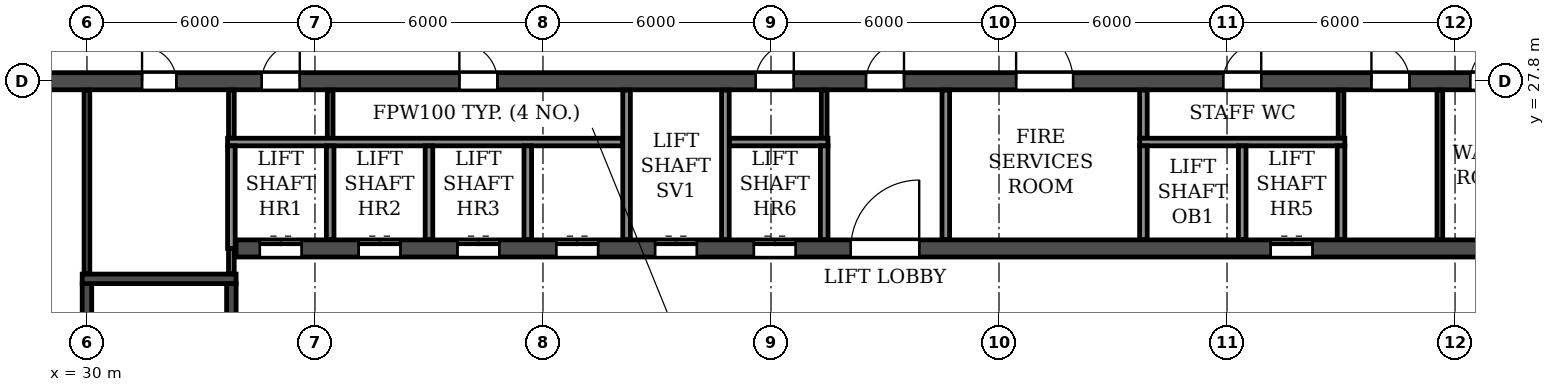
"""IFC4 building model, lengths in metres.
Left out: names, types, materials, properties, quantities, classifications, styles, units other than length and angle.
Written with IfcOpenShell. Run it as: python <this file> out.ifc"""

import sys

from ifc_helpers import new_model, si_unit, direction, frame, frame_2d, origin, place, context, subcontext, project, spatial, rectangle, extrude, element, fill, save


model = new_model("IFC4")
c1 = context("Model", 3, precision=1e-05, world=origin(), true_north=direction((0.0, 1.0)))
c2 = subcontext(c1, "Body", "Model", "MODEL_VIEW")
j1 = project(units=[si_unit("LENGTHUNIT", "METRE"), si_unit("PLANEANGLEUNIT", "RADIAN")], contexts=[c1])
p1 = place(None, origin())
s1 = spatial("IfcSite", under=j1, at=p1, CompositionType="ELEMENT")
p2 = place(p1, origin())
s2 = spatial("IfcBuilding", under=s1, at=p2, CompositionType="ELEMENT")
p3 = place(p2, frame((0.0, 0.0, 155.4)))
s3 = spatial("IfcBuildingStorey", under=s2, at=p3, CompositionType="ELEMENT", Elevation=155.4)
p4 = place(p3, frame((12.2, 27.8, 0.0), z_axis=(0.0, 0.0, 1.0), x_axis=(1.0, 0.0, 0.0)))
e1 = element("IfcWall", 1, at=p4, inside=s3, PredefinedType="SOLIDWALL", context=c2, shape_type="SweptSolid", body=[
    extrude(rectangle(XDim=77.6, YDim=0.45, at=frame_2d((38.8, 0.0))), origin(), (0.0, 0.0, 1.0), 3.0),
])
p5 = place(p4, frame((2.3, 0.0, 0.0)))
e2 = element("IfcOpeningElement", 2, at=p5, cuts=e1, PredefinedType="OPENING", context=c2, shape_type="SweptSolid", body=[
    extrude(rectangle(XDim=1.0, YDim=2.1, at=frame_2d((0.5, 1.05))), frame((0.0, 0.235, 0.0), z_axis=(0.0, -1.0, 0.0), x_axis=(1.0, 0.0, 0.0)), (0.0, 0.0, 1.0), 0.47),
])
p6 = place(p4, frame((6.7, 0.0, 0.0)))
e3 = element("IfcOpeningElement", 3, at=p6, cuts=e1, PredefinedType="OPENING", context=c2, shape_type="SweptSolid", body=[
    extrude(rectangle(XDim=1.0, YDim=2.1, at=frame_2d((0.5, 1.05))), frame((0.0, 0.235, 0.0), z_axis=(0.0, -1.0, 0.0), x_axis=(1.0, 0.0, 0.0)), (0.0, 0.0, 1.0), 0.47),
])
p7 = place(p4, frame((10.05, 0.0, 0.0)))
e4 = element("IfcOpeningElement", 4, at=p7, cuts=e1, PredefinedType="OPENING", context=c2, shape_type="SweptSolid", body=[
    extrude(rectangle(XDim=0.9, YDim=2.1, at=frame_2d((0.45, 1.05))), frame((0.0, 0.235, 0.0), z_axis=(0.0, -1.0, 0.0), x_axis=(1.0, 0.0, 0.0)), (0.0, 0.0, 1.0), 0.47),
])
p8 = place(p4, frame((19.25, 0.0, 0.0)))
e5 = element("IfcOpeningElement", 5, at=p8, cuts=e1, PredefinedType="OPENING", context=c2, shape_type="SweptSolid", body=[
    extrude(rectangle(XDim=0.9, YDim=2.1, at=frame_2d((0.45, 1.05))), frame((0.0, 0.235, 0.0), z_axis=(0.0, -1.0, 0.0), x_axis=(1.0, 0.0, 0.0)), (0.0, 0.0, 1.0), 0.47),
])
p9 = place(p4, frame((22.4, 0.0, 0.0)))
e6 = element("IfcOpeningElement", 6, at=p9, cuts=e1, PredefinedType="OPENING", context=c2, shape_type="SweptSolid", body=[
    extrude(rectangle(XDim=1.0, YDim=2.1, at=frame_2d((0.5, 1.05))), frame((0.0, 0.235, 0.0), z_axis=(0.0, -1.0, 0.0), x_axis=(1.0, 0.0, 0.0)), (0.0, 0.0, 1.0), 0.47),
])
p10 = place(p4, frame((27.6, 0.0, 0.0)))
e7 = element("IfcOpeningElement", 7, at=p10, cuts=e1, PredefinedType="OPENING", context=c2, shape_type="SweptSolid", body=[
    extrude(rectangle(XDim=1.0, YDim=2.1, at=frame_2d((0.5, 1.05))), frame((0.0, 0.235, 0.0), z_axis=(0.0, -1.0, 0.0), x_axis=(1.0, 0.0, 0.0)), (0.0, 0.0, 1.0), 0.47),
])
p11 = place(p4, frame((35.4, 0.0, 0.0)))
e8 = element("IfcOpeningElement", 8, at=p11, cuts=e1, PredefinedType="OPENING", context=c2, shape_type="SweptSolid", body=[
    extrude(rectangle(XDim=1.0, YDim=2.1, at=frame_2d((0.5, 1.05))), frame((0.0, 0.235, 0.0), z_axis=(0.0, -1.0, 0.0), x_axis=(1.0, 0.0, 0.0)), (0.0, 0.0, 1.0), 0.47),
])
p12 = place(p4, frame((38.3, 0.0, 0.0)))
e9 = element("IfcOpeningElement", 9, at=p12, cuts=e1, PredefinedType="OPENING", context=c2, shape_type="SweptSolid", body=[
    extrude(rectangle(XDim=1.0, YDim=2.1, at=frame_2d((0.5, 1.05))), frame((0.0, 0.235, 0.0), z_axis=(0.0, -1.0, 0.0), x_axis=(1.0, 0.0, 0.0)), (0.0, 0.0, 1.0), 0.47),
])
p13 = place(p4, frame((42.25, 0.0, 0.0)))
e10 = element("IfcOpeningElement", 10, at=p13, cuts=e1, PredefinedType="OPENING", context=c2, shape_type="SweptSolid", body=[
    extrude(rectangle(XDim=1.5, YDim=2.1, at=frame_2d((0.75, 1.05))), frame((0.0, 0.235, 0.0), z_axis=(0.0, -1.0, 0.0), x_axis=(1.0, 0.0, 0.0)), (0.0, 0.0, 1.0), 0.47),
])
p14 = place(p4, frame((47.7, 0.0, 0.0)))
e11 = element("IfcOpeningElement", 11, at=p14, cuts=e1, PredefinedType="OPENING", context=c2, shape_type="SweptSolid", body=[
    extrude(rectangle(XDim=1.0, YDim=2.1, at=frame_2d((0.5, 1.05))), frame((0.0, 0.235, 0.0), z_axis=(0.0, -1.0, 0.0), x_axis=(1.0, 0.0, 0.0)), (0.0, 0.0, 1.0), 0.47),
])
p15 = place(p4, frame((51.6, 0.0, 0.0)))
e12 = element("IfcOpeningElement", 12, at=p15, cuts=e1, PredefinedType="OPENING", context=c2, shape_type="SweptSolid", body=[
    extrude(rectangle(XDim=1.0, YDim=2.1, at=frame_2d((0.5, 1.05))), frame((0.0, 0.235, 0.0), z_axis=(0.0, -1.0, 0.0), x_axis=(1.0, 0.0, 0.0)), (0.0, 0.0, 1.0), 0.47),
])
p16 = place(p4, frame((54.2, 0.0, 0.0)))
e13 = element("IfcOpeningElement", 13, at=p16, cuts=e1, PredefinedType="OPENING", context=c2, shape_type="SweptSolid", body=[
    extrude(rectangle(XDim=1.0, YDim=2.1, at=frame_2d((0.5, 1.05))), frame((0.0, 0.235, 0.0), z_axis=(0.0, -1.0, 0.0), x_axis=(1.0, 0.0, 0.0)), (0.0, 0.0, 1.0), 0.47),
])
p17 = place(p4, frame((57.45, 0.0, 0.0)))
e14 = element("IfcOpeningElement", 14, at=p17, cuts=e1, PredefinedType="OPENING", context=c2, shape_type="SweptSolid", body=[
    extrude(rectangle(XDim=0.9, YDim=2.1, at=frame_2d((0.45, 1.05))), frame((0.0, 0.235, 0.0), z_axis=(0.0, -1.0, 0.0), x_axis=(1.0, 0.0, 0.0)), (0.0, 0.0, 1.0), 0.47),
])
p18 = place(p4, frame((66.65, 0.0, 0.0)))
e15 = element("IfcOpeningElement", 15, at=p18, cuts=e1, PredefinedType="OPENING", context=c2, shape_type="SweptSolid", body=[
    extrude(rectangle(XDim=0.9, YDim=2.1, at=frame_2d((0.45, 1.05))), frame((0.0, 0.235, 0.0), z_axis=(0.0, -1.0, 0.0), x_axis=(1.0, 0.0, 0.0)), (0.0, 0.0, 1.0), 0.47),
])
p19 = place(p4, frame((69.9, 0.0, 0.0)))
e16 = element("IfcOpeningElement", 16, at=p19, cuts=e1, PredefinedType="OPENING", context=c2, shape_type="SweptSolid", body=[
    extrude(rectangle(XDim=1.0, YDim=2.1, at=frame_2d((0.5, 1.05))), frame((0.0, 0.235, 0.0), z_axis=(0.0, -1.0, 0.0), x_axis=(1.0, 0.0, 0.0)), (0.0, 0.0, 1.0), 0.47),
])
p20 = place(p4, frame((74.3, 0.0, 0.0)))
e17 = element("IfcOpeningElement", 17, at=p20, cuts=e1, PredefinedType="OPENING", context=c2, shape_type="SweptSolid", body=[
    extrude(rectangle(XDim=1.0, YDim=2.1, at=frame_2d((0.5, 1.05))), frame((0.0, 0.235, 0.0), z_axis=(0.0, -1.0, 0.0), x_axis=(1.0, 0.0, 0.0)), (0.0, 0.0, 1.0), 0.47),
])
p21 = place(p3, frame((33.925, 23.4, 0.0), z_axis=(0.0, 0.0, 1.0), x_axis=(1.0, 0.0, 0.0)))
e18 = element("IfcWall", 18, at=p21, inside=s3, PredefinedType="SOLIDWALL", context=c2, shape_type="SweptSolid", body=[
    extrude(rectangle(XDim=34.15, YDim=0.45, at=frame_2d((17.075, 0.0))), origin(), (0.0, 0.0, 1.0), 3.0),
])
p22 = place(p21, frame((16.175, 0.0, 0.0)))
e19 = element("IfcOpeningElement", 19, at=p22, cuts=e18, PredefinedType="OPENING", context=c2, shape_type="SweptSolid", body=[
    extrude(rectangle(XDim=1.8, YDim=2.1, at=frame_2d((0.9, 1.05))), frame((0.0, 0.235, 0.0), z_axis=(0.0, -1.0, 0.0), x_axis=(1.0, 0.0, 0.0)), (0.0, 0.0, 1.0), 0.47),
])
p23 = place(p21, frame((0.625, 0.0, 0.0)))
e20 = element("IfcOpeningElement", 20, at=p23, cuts=e18, PredefinedType="OPENING", context=c2, shape_type="SweptSolid", body=[
    extrude(rectangle(XDim=1.1, YDim=2.1, at=frame_2d((0.55, 1.05))), frame((0.0, 0.235, 0.0), z_axis=(0.0, -1.0, 0.0), x_axis=(1.0, 0.0, 0.0)), (0.0, 0.0, 1.0), 0.47),
])
p24 = place(p21, frame((3.225, 0.0, 0.0)))
e21 = element("IfcOpeningElement", 21, at=p24, cuts=e18, PredefinedType="OPENING", context=c2, shape_type="SweptSolid", body=[
    extrude(rectangle(XDim=1.1, YDim=2.1, at=frame_2d((0.55, 1.05))), frame((0.0, 0.235, 0.0), z_axis=(0.0, -1.0, 0.0), x_axis=(1.0, 0.0, 0.0)), (0.0, 0.0, 1.0), 0.47),
])
p25 = place(p21, frame((5.825, 0.0, 0.0)))
e22 = element("IfcOpeningElement", 22, at=p25, cuts=e18, PredefinedType="OPENING", context=c2, shape_type="SweptSolid", body=[
    extrude(rectangle(XDim=1.1, YDim=2.1, at=frame_2d((0.55, 1.05))), frame((0.0, 0.235, 0.0), z_axis=(0.0, -1.0, 0.0), x_axis=(1.0, 0.0, 0.0)), (0.0, 0.0, 1.0), 0.47),
])
p26 = place(p21, frame((8.425, 0.0, 0.0)))
e23 = element("IfcOpeningElement", 23, at=p26, cuts=e18, PredefinedType="OPENING", context=c2, shape_type="SweptSolid", body=[
    extrude(rectangle(XDim=1.1, YDim=2.1, at=frame_2d((0.55, 1.05))), frame((0.0, 0.235, 0.0), z_axis=(0.0, -1.0, 0.0), x_axis=(1.0, 0.0, 0.0)), (0.0, 0.0, 1.0), 0.47),
])
p27 = place(p21, frame((11.025, 0.0, 0.0)))
e24 = element("IfcOpeningElement", 24, at=p27, cuts=e18, PredefinedType="OPENING", context=c2, shape_type="SweptSolid", body=[
    extrude(rectangle(XDim=1.1, YDim=2.1, at=frame_2d((0.55, 1.05))), frame((0.0, 0.235, 0.0), z_axis=(0.0, -1.0, 0.0), x_axis=(1.0, 0.0, 0.0)), (0.0, 0.0, 1.0), 0.47),
])
p28 = place(p21, frame((13.625, 0.0, 0.0)))
e25 = element("IfcOpeningElement", 25, at=p28, cuts=e18, PredefinedType="OPENING", context=c2, shape_type="SweptSolid", body=[
    extrude(rectangle(XDim=1.1, YDim=2.1, at=frame_2d((0.55, 1.05))), frame((0.0, 0.235, 0.0), z_axis=(0.0, -1.0, 0.0), x_axis=(1.0, 0.0, 0.0)), (0.0, 0.0, 1.0), 0.47),
])
p29 = place(p21, frame((27.225, 0.0, 0.0)))
e26 = element("IfcOpeningElement", 26, at=p29, cuts=e18, PredefinedType="OPENING", context=c2, shape_type="SweptSolid", body=[
    extrude(rectangle(XDim=1.1, YDim=2.1, at=frame_2d((0.55, 1.05))), frame((0.0, 0.235, 0.0), z_axis=(0.0, -1.0, 0.0), x_axis=(1.0, 0.0, 0.0)), (0.0, 0.0, 1.0), 0.47),
])
p30 = place(p3, frame((30.0, 14.825, 0.0), z_axis=(0.0, 0.0, 1.0), x_axis=(0.0, 1.0, 0.0)))
e27 = element("IfcWall", 27, at=p30, inside=s3, PredefinedType="SOLIDWALL", context=c2, shape_type="SweptSolid", body=[
    extrude(rectangle(XDim=7.65, YDim=0.25, at=frame_2d((3.825, 0.0))), origin(), (0.0, 0.0, 1.0), 3.0),
])
p31 = place(p3, frame((33.8, 14.825, 0.0), z_axis=(0.0, 0.0, 1.0), x_axis=(0.0, 1.0, 0.0)))
e28 = element("IfcWall", 28, at=p31, inside=s3, PredefinedType="SOLIDWALL", context=c2, shape_type="SweptSolid", body=[
    extrude(rectangle(XDim=7.65, YDim=0.25, at=frame_2d((3.825, 0.0))), origin(), (0.0, 0.0, 1.0), 3.0),
])
p32 = place(p31, frame((0.475, 0.0, 0.0)))
e29 = element("IfcOpeningElement", 29, at=p32, cuts=e28, PredefinedType="OPENING", context=c2, shape_type="SweptSolid", body=[
    extrude(rectangle(XDim=1.0, YDim=2.1, at=frame_2d((0.5, 1.05))), frame((0.0, 0.135, 0.0), z_axis=(0.0, -1.0, 0.0), x_axis=(1.0, 0.0, 0.0)), (0.0, 0.0, 1.0), 0.27),
])
p33 = place(p3, frame((29.875, 22.6, 0.0), z_axis=(0.0, 0.0, 1.0), x_axis=(1.0, 0.0, 0.0)))
e30 = element("IfcWall", 30, at=p33, inside=s3, PredefinedType="SOLIDWALL", context=c2, shape_type="SweptSolid", body=[
    extrude(rectangle(XDim=4.05, YDim=0.25, at=frame_2d((2.025, 0.0))), origin(), (0.0, 0.0, 1.0), 3.0),
])
for number, where, z_axis, x_axis in (
    (31, (49.4, 26.3, 0.0), (0.0, 0.0, 1.0), (0.0, 1.0, 0.0)),
    (32, (36.4, 26.3, 0.0), (0.0, 0.0, 1.0), (0.0, 1.0, 0.0)),
    (33, (63.0, 26.3, 0.0), (0.0, 0.0, 1.0), (0.0, 1.0, 0.0)),
):
    element("IfcWall", number, at=place(p3, frame(where, z_axis=z_axis, x_axis=x_axis)), inside=s3, PredefinedType="PARTITIONING", context=c2, shape_type="SweptSolid", body=[
        extrude(rectangle(XDim=1.265, YDim=0.15, at=frame_2d((0.632, 0.0))), origin(), (0.0, 0.0, 1.0), 3.0),
    ])
p34 = place(p3, frame((65.6, 23.635, 0.0), z_axis=(0.0, 0.0, 1.0), x_axis=(0.0, 1.0, 0.0)))
e34 = element("IfcWall", 34, at=p34, inside=s3, PredefinedType="PARTITIONING", context=c2, shape_type="SweptSolid", body=[
    extrude(rectangle(XDim=3.93, YDim=0.15, at=frame_2d((1.965, 0.0))), origin(), (0.0, 0.0, 1.0), 3.0),
])
p35 = place(p3, frame((52.6, 23.635, 0.0), z_axis=(0.0, 0.0, 1.0), x_axis=(0.0, 1.0, 0.0)))
e35 = element("IfcWall", 35, at=p35, inside=s3, PredefinedType="PARTITIONING", context=c2, shape_type="SweptSolid", body=[
    extrude(rectangle(XDim=3.93, YDim=0.2, at=frame_2d((1.965, 0.0))), origin(), (0.0, 0.0, 1.0), 3.0),
])
p36 = place(p3, frame((57.8, 26.3, 0.0), z_axis=(0.0, 0.0, 1.0), x_axis=(0.0, 1.0, 0.0)))
e36 = element("IfcWall", 36, at=p36, inside=s3, PredefinedType="PARTITIONING", context=c2, shape_type="SweptSolid", body=[
    extrude(rectangle(XDim=1.265, YDim=0.2, at=frame_2d((0.632, 0.0))), origin(), (0.0, 0.0, 1.0), 3.0),
])
p37 = place(p3, frame((30.0, 22.735, 0.0), z_axis=(0.0, 0.0, 1.0), x_axis=(0.0, 1.0, 0.0)))
e37 = element("IfcWall", 37, at=p37, inside=s3, PredefinedType="PARTITIONING", context=c2, shape_type="SweptSolid", body=[
    extrude(rectangle(XDim=4.83, YDim=0.15, at=frame_2d((2.415, 0.0))), origin(), (0.0, 0.0, 1.0), 3.0),
])
p38 = place(p3, frame((33.8, 22.735, 0.0), z_axis=(0.0, 0.0, 1.0), x_axis=(0.0, 1.0, 0.0)))
e38 = element("IfcWall", 38, at=p38, inside=s3, PredefinedType="PARTITIONING", context=c2, shape_type="SweptSolid", body=[
    extrude(rectangle(XDim=0.665, YDim=0.15, at=frame_2d((0.333, 0.0))), origin(), (0.0, 0.0, 1.0), 3.0),
])
p39 = place(p3, frame((33.8, 26.3, 0.0), z_axis=(0.0, 0.0, 1.0), x_axis=(0.0, 1.0, 0.0)))
e39 = element("IfcWall", 39, at=p39, inside=s3, PredefinedType="PARTITIONING", context=c2, shape_type="SweptSolid", body=[
    extrude(rectangle(XDim=1.265, YDim=0.15, at=frame_2d((0.632, 0.0))), origin(), (0.0, 0.0, 1.0), 3.0),
])
p40 = place(p3, frame((33.7, 26.2, 0.0), z_axis=(0.0, 0.0, 1.0), x_axis=(1.0, 0.0, 0.0)))
e40 = element("IfcWall", 40, at=p40, inside=s3, PredefinedType="PARTITIONING", context=c2, shape_type="SweptSolid", body=[
    extrude(rectangle(XDim=10.4, YDim=0.2, at=frame_2d((5.2, 0.0))), origin(), (0.0, 0.0, 1.0), 3.0),
])
p41 = place(p3, frame((46.9, 26.2, 0.0), z_axis=(0.0, 0.0, 1.0), x_axis=(1.0, 0.0, 0.0)))
e41 = element("IfcWall", 41, at=p41, inside=s3, PredefinedType="PARTITIONING", context=c2, shape_type="SweptSolid", body=[
    extrude(rectangle(XDim=2.6, YDim=0.2, at=frame_2d((1.3, 0.0))), origin(), (0.0, 0.0, 1.0), 3.0),
])
p42 = place(p3, frame((57.7, 26.2, 0.0), z_axis=(0.0, 0.0, 1.0), x_axis=(1.0, 0.0, 0.0)))
e42 = element("IfcWall", 42, at=p42, inside=s3, PredefinedType="PARTITIONING", context=c2, shape_type="SweptSolid", body=[
    extrude(rectangle(XDim=5.4, YDim=0.2, at=frame_2d((2.7, 0.0))), origin(), (0.0, 0.0, 1.0), 3.0),
])
p43 = place(p3, frame((33.8, 23.4, 0.0), z_axis=(0.0, 0.0, 1.0), x_axis=(0.0, 1.0, 0.0)))
e43 = element("IfcWall", 43, at=p43, inside=s3, PredefinedType="PARTITIONING", context=c2, shape_type="SweptSolid", body=[
    extrude(rectangle(XDim=2.7, YDim=0.2, at=frame_2d((1.35, 0.0))), origin(), (0.0, 0.0, 1.0), 3.0),
])
for number, where, z_axis, x_axis in (
    (44, (36.4, 23.635, 0.0), (0.0, 0.0, 1.0), (0.0, 1.0, 0.0)),
    (45, (39.0, 23.635, 0.0), (0.0, 0.0, 1.0), (0.0, 1.0, 0.0)),
    (46, (41.6, 23.635, 0.0), (0.0, 0.0, 1.0), (0.0, 1.0, 0.0)),
):
    element("IfcWall", number, at=place(p3, frame(where, z_axis=z_axis, x_axis=x_axis)), inside=s3, PredefinedType="PARTITIONING", context=c2, shape_type="SweptSolid", body=[
        extrude(rectangle(XDim=2.465, YDim=0.2, at=frame_2d((1.232, 0.0))), origin(), (0.0, 0.0, 1.0), 3.0),
    ])
for number, where, z_axis, x_axis in (
    (47, (44.2, 23.635, 0.0), (0.0, 0.0, 1.0), (0.0, 1.0, 0.0)),
    (48, (46.8, 23.635, 0.0), (0.0, 0.0, 1.0), (0.0, 1.0, 0.0)),
):
    element("IfcWall", number, at=place(p3, frame(where, z_axis=z_axis, x_axis=x_axis)), inside=s3, PredefinedType="PARTITIONING", context=c2, shape_type="SweptSolid", body=[
        extrude(rectangle(XDim=3.93, YDim=0.2, at=frame_2d((1.965, 0.0))), origin(), (0.0, 0.0, 1.0), 3.0),
    ])
for number, where, z_axis, x_axis in (
    (49, (49.4, 23.635, 0.0), (0.0, 0.0, 1.0), (0.0, 1.0, 0.0)),
    (50, (57.8, 23.635, 0.0), (0.0, 0.0, 1.0), (0.0, 1.0, 0.0)),
    (51, (60.4, 23.635, 0.0), (0.0, 0.0, 1.0), (0.0, 1.0, 0.0)),
    (52, (63.0, 23.635, 0.0), (0.0, 0.0, 1.0), (0.0, 1.0, 0.0)),
):
    element("IfcWall", number, at=place(p3, frame(where, z_axis=z_axis, x_axis=x_axis)), inside=s3, PredefinedType="PARTITIONING", context=c2, shape_type="SweptSolid", body=[
        extrude(rectangle(XDim=2.465, YDim=0.2, at=frame_2d((1.232, 0.0))), origin(), (0.0, 0.0, 1.0), 3.0),
    ])
p44 = place(p8, origin())
e53 = element("IfcDoor", 53, at=p44, inside=s3, OperationType="SINGLE_SWING_LEFT", PredefinedType="DOOR", context=c2, shape_type="SweptSolid", body=[
    extrude(rectangle(XDim=0.9, YDim=2.1, at=frame_2d((0.45, 1.05))), frame((0.0, 0.025, 0.0), z_axis=(0.0, -1.0, 0.0), x_axis=(1.0, 0.0, 0.0)), (0.0, 0.0, 1.0), 0.05),
])
fill(e5, e53)
p45 = place(p9, origin())
e54 = element("IfcDoor", 54, at=p45, inside=s3, OperationType="SINGLE_SWING_RIGHT", PredefinedType="DOOR", context=c2, shape_type="SweptSolid", body=[
    extrude(rectangle(XDim=1.0, YDim=2.1, at=frame_2d((0.5, 1.05))), frame((0.0, 0.025, 0.0), z_axis=(0.0, -1.0, 0.0), x_axis=(1.0, 0.0, 0.0)), (0.0, 0.0, 1.0), 0.05),
])
fill(e6, e54)
p46 = place(p10, origin())
e55 = element("IfcDoor", 55, at=p46, inside=s3, OperationType="SINGLE_SWING_LEFT", PredefinedType="DOOR", context=c2, shape_type="SweptSolid", body=[
    extrude(rectangle(XDim=1.0, YDim=2.1, at=frame_2d((0.5, 1.05))), frame((0.0, 0.025, 0.0), z_axis=(0.0, -1.0, 0.0), x_axis=(1.0, 0.0, 0.0)), (0.0, 0.0, 1.0), 0.05),
])
fill(e7, e55)
p47 = place(p11, origin())
e56 = element("IfcDoor", 56, at=p47, inside=s3, OperationType="SINGLE_SWING_RIGHT", PredefinedType="DOOR", context=c2, shape_type="SweptSolid", body=[
    extrude(rectangle(XDim=1.0, YDim=2.1, at=frame_2d((0.5, 1.05))), frame((0.0, 0.025, 0.0), z_axis=(0.0, -1.0, 0.0), x_axis=(1.0, 0.0, 0.0)), (0.0, 0.0, 1.0), 0.05),
])
fill(e8, e56)
p48 = place(p12, origin())
e57 = element("IfcDoor", 57, at=p48, inside=s3, OperationType="SINGLE_SWING_RIGHT", PredefinedType="DOOR", context=c2, shape_type="SweptSolid", body=[
    extrude(rectangle(XDim=1.0, YDim=2.1, at=frame_2d((0.5, 1.05))), frame((0.0, 0.025, 0.0), z_axis=(0.0, -1.0, 0.0), x_axis=(1.0, 0.0, 0.0)), (0.0, 0.0, 1.0), 0.05),
])
fill(e9, e57)
p49 = place(p13, origin())
e58 = element("IfcDoor", 58, at=p49, inside=s3, OperationType="DOUBLE_DOOR_SINGLE_SWING", PredefinedType="DOOR", context=c2, shape_type="SweptSolid", body=[
    extrude(rectangle(XDim=1.5, YDim=2.1, at=frame_2d((0.75, 1.05))), frame((0.0, 0.025, 0.0), z_axis=(0.0, -1.0, 0.0), x_axis=(1.0, 0.0, 0.0)), (0.0, 0.0, 1.0), 0.05),
])
fill(e10, e58)
p50 = place(p14, origin())
e59 = element("IfcDoor", 59, at=p50, inside=s3, OperationType="SINGLE_SWING_RIGHT", PredefinedType="DOOR", context=c2, shape_type="SweptSolid", body=[
    extrude(rectangle(XDim=1.0, YDim=2.1, at=frame_2d((0.5, 1.05))), frame((0.0, 0.025, 0.0), z_axis=(0.0, -1.0, 0.0), x_axis=(1.0, 0.0, 0.0)), (0.0, 0.0, 1.0), 0.05),
])
fill(e11, e59)
p51 = place(p15, origin())
e60 = element("IfcDoor", 60, at=p51, inside=s3, OperationType="SINGLE_SWING_LEFT", PredefinedType="DOOR", context=c2, shape_type="SweptSolid", body=[
    extrude(rectangle(XDim=1.0, YDim=2.1, at=frame_2d((0.5, 1.05))), frame((0.0, 0.025, 0.0), z_axis=(0.0, -1.0, 0.0), x_axis=(1.0, 0.0, 0.0)), (0.0, 0.0, 1.0), 0.05),
])
fill(e12, e60)
p52 = place(p16, origin())
e61 = element("IfcDoor", 61, at=p52, inside=s3, OperationType="SINGLE_SWING_RIGHT", PredefinedType="DOOR", context=c2, shape_type="SweptSolid", body=[
    extrude(rectangle(XDim=1.0, YDim=2.1, at=frame_2d((0.5, 1.05))), frame((0.0, 0.025, 0.0), z_axis=(0.0, -1.0, 0.0), x_axis=(1.0, 0.0, 0.0)), (0.0, 0.0, 1.0), 0.05),
])
fill(e13, e61)
p53 = place(p22, origin())
e62 = element("IfcDoor", 62, at=p53, inside=s3, OperationType="DOUBLE_DOOR_SINGLE_SWING", PredefinedType="DOOR", context=c2, shape_type="SweptSolid", body=[
    extrude(rectangle(XDim=1.8, YDim=2.1, at=frame_2d((0.9, 1.05))), frame((0.0, 0.025, 0.0), z_axis=(0.0, -1.0, 0.0), x_axis=(1.0, 0.0, 0.0)), (0.0, 0.0, 1.0), 0.05),
])
fill(e19, e62)
p54 = place(p23, origin())
e63 = element("IfcDoor", 63, at=p54, inside=s3, OperationType="DOUBLE_DOOR_SLIDING", PredefinedType="DOOR", context=c2, shape_type="SweptSolid", body=[
    extrude(rectangle(XDim=1.1, YDim=2.1, at=frame_2d((0.55, 1.05))), frame((0.0, 0.025, 0.0), z_axis=(0.0, -1.0, 0.0), x_axis=(1.0, 0.0, 0.0)), (0.0, 0.0, 1.0), 0.05),
])
fill(e20, e63)
p55 = place(p24, origin())
e64 = element("IfcDoor", 64, at=p55, inside=s3, OperationType="DOUBLE_DOOR_SLIDING", PredefinedType="DOOR", context=c2, shape_type="SweptSolid", body=[
    extrude(rectangle(XDim=1.1, YDim=2.1, at=frame_2d((0.55, 1.05))), frame((0.0, 0.025, 0.0), z_axis=(0.0, -1.0, 0.0), x_axis=(1.0, 0.0, 0.0)), (0.0, 0.0, 1.0), 0.05),
])
fill(e21, e64)
p56 = place(p25, origin())
e65 = element("IfcDoor", 65, at=p56, inside=s3, OperationType="DOUBLE_DOOR_SLIDING", PredefinedType="DOOR", context=c2, shape_type="SweptSolid", body=[
    extrude(rectangle(XDim=1.1, YDim=2.1, at=frame_2d((0.55, 1.05))), frame((0.0, 0.025, 0.0), z_axis=(0.0, -1.0, 0.0), x_axis=(1.0, 0.0, 0.0)), (0.0, 0.0, 1.0), 0.05),
])
fill(e22, e65)
p57 = place(p26, origin())
e66 = element("IfcDoor", 66, at=p57, inside=s3, OperationType="DOUBLE_DOOR_SLIDING", PredefinedType="DOOR", context=c2, shape_type="SweptSolid", body=[
    extrude(rectangle(XDim=1.1, YDim=2.1, at=frame_2d((0.55, 1.05))), frame((0.0, 0.025, 0.0), z_axis=(0.0, -1.0, 0.0), x_axis=(1.0, 0.0, 0.0)), (0.0, 0.0, 1.0), 0.05),
])
fill(e23, e66)
p58 = place(p27, origin())
e67 = element("IfcDoor", 67, at=p58, inside=s3, OperationType="DOUBLE_DOOR_SLIDING", PredefinedType="DOOR", context=c2, shape_type="SweptSolid", body=[
    extrude(rectangle(XDim=1.1, YDim=2.1, at=frame_2d((0.55, 1.05))), frame((0.0, 0.025, 0.0), z_axis=(0.0, -1.0, 0.0), x_axis=(1.0, 0.0, 0.0)), (0.0, 0.0, 1.0), 0.05),
])
fill(e24, e67)
p59 = place(p28, origin())
e68 = element("IfcDoor", 68, at=p59, inside=s3, OperationType="DOUBLE_DOOR_SLIDING", PredefinedType="DOOR", context=c2, shape_type="SweptSolid", body=[
    extrude(rectangle(XDim=1.1, YDim=2.1, at=frame_2d((0.55, 1.05))), frame((0.0, 0.025, 0.0), z_axis=(0.0, -1.0, 0.0), x_axis=(1.0, 0.0, 0.0)), (0.0, 0.0, 1.0), 0.05),
])
fill(e25, e68)
p60 = place(p29, origin())
e69 = element("IfcDoor", 69, at=p60, inside=s3, OperationType="DOUBLE_DOOR_SLIDING", PredefinedType="DOOR", context=c2, shape_type="SweptSolid", body=[
    extrude(rectangle(XDim=1.1, YDim=2.1, at=frame_2d((0.55, 1.05))), frame((0.0, 0.025, 0.0), z_axis=(0.0, -1.0, 0.0), x_axis=(1.0, 0.0, 0.0)), (0.0, 0.0, 1.0), 0.05),
])
fill(e26, e69)
save(model, sys.argv[1])
